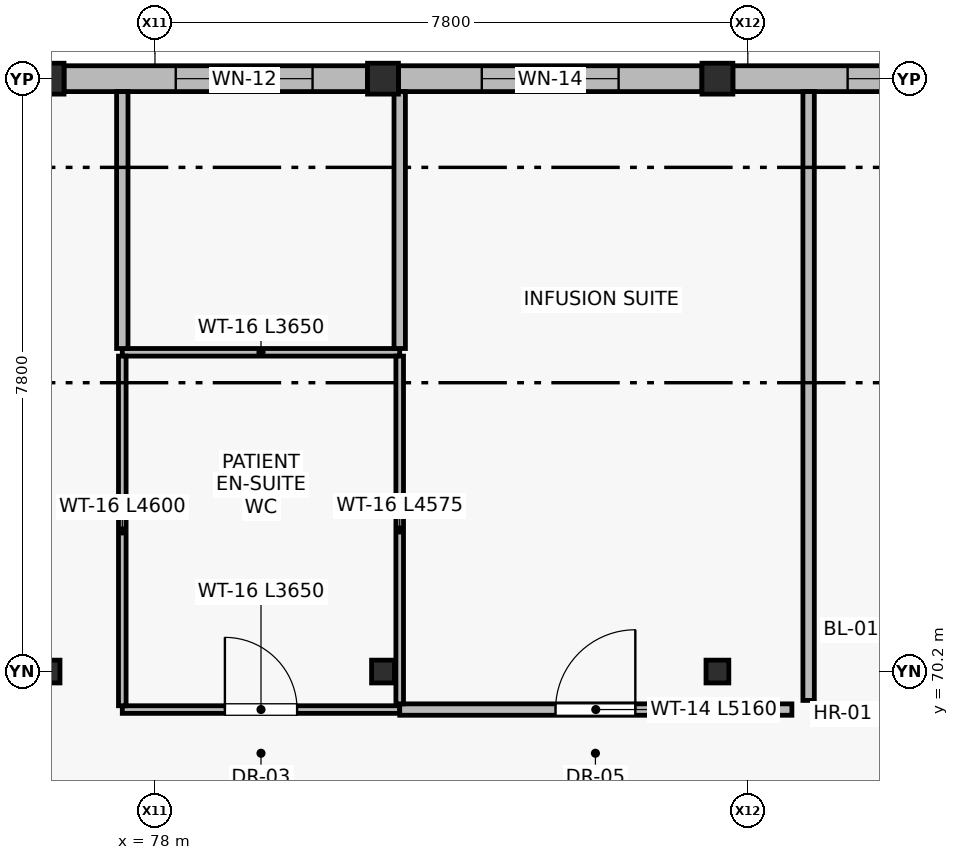
"""IFC4 building model, lengths in metres.
Left out: names, types, materials, properties, quantities, classifications, styles, units other than length and angle.
Written with IfcOpenShell. Run it as: python <this file> out.ifc"""

import sys

from ifc_helpers import new_model, si_unit, direction, frame, frame_2d, origin, origin_2d, place, context, subcontext, project, spatial, rectangle, hollow_circle, i_section, extrude, element, fill, save


model = new_model("IFC4")
c1 = context("Model", 3, precision=1e-05, world=origin(), true_north=direction((0.0, 1.0)))
c2 = subcontext(c1, "Body", "Model", "MODEL_VIEW")
j1 = project(units=[si_unit("LENGTHUNIT", "METRE"), si_unit("PLANEANGLEUNIT", "RADIAN")], contexts=[c1])
p1 = place(None, origin())
s1 = spatial("IfcSite", under=j1, at=p1, CompositionType="ELEMENT")
p2 = place(p1, origin())
s2 = spatial("IfcBuilding", under=s1, at=p2, CompositionType="ELEMENT")
p3 = place(p2, origin())
s3 = spatial("IfcBuildingStorey", under=s2, at=p3, CompositionType="ELEMENT", Elevation=0.0)
for number, where, z_axis, x_axis in (
    (1, (76.6, 78.0, 0.0), (0.0, 0.0, 1.0), (1.0, 0.0, 0.0)),
    (2, (81.0, 78.0, 0.0), (0.0, 0.0, 1.0), (1.0, 0.0, 0.0)),
    (3, (85.4, 78.0, 0.0), (0.0, 0.0, 1.0), (1.0, 0.0, 0.0)),
):
    element("IfcColumn", number, at=place(p3, frame(where, z_axis=z_axis, x_axis=x_axis)), inside=s3, PredefinedType="COLUMN", context=c2, shape_type="SweptSolid", body=[
        extrude(hollow_circle(Radius=0.203, WallThickness=0.016, at=origin_2d()), origin(), (0.0, 0.0, 1.0), 4.8),
    ])
for number, where, z_axis, x_axis in (
    (4, (76.6, 70.2, 0.0), (0.0, 0.0, 1.0), (1.0, 0.0, 0.0)),
    (5, (81.0, 70.2, 0.0), (0.0, 0.0, 1.0), (1.0, 0.0, 0.0)),
    (6, (85.4, 70.2, 0.0), (0.0, 0.0, 1.0), (1.0, 0.0, 0.0)),
):
    element("IfcColumn", number, at=place(p3, frame(where, z_axis=z_axis, x_axis=x_axis)), inside=s3, PredefinedType="COLUMN", context=c2, shape_type="SweptSolid", body=[
        extrude(i_section(OverallWidth=0.3, OverallDepth=0.3, WebThickness=0.011, FlangeThickness=0.019, at=origin_2d()), origin(), (0.0, 0.0, 1.0), 4.8),
    ])
p4 = place(p3, frame((76.803, 78.0, 0.0), z_axis=(0.0, 0.0, 1.0), x_axis=(1.0, 0.0, 0.0)))
e7 = element("IfcWall", 7, at=p4, inside=s3, PredefinedType="STANDARD", context=c2, shape_type="SweptSolid", body=[
    extrude(rectangle(XDim=3.994, YDim=0.34, at=frame_2d((1.997, 0.0))), origin(), (0.0, 0.0, 1.0), 4.14),
])
p5 = place(p4, frame((1.47, 0.0, 0.9)))
e8 = element("IfcOpeningElement", 8, at=p5, cuts=e7, PredefinedType="OPENING", context=c2, shape_type="SweptSolid", body=[
    extrude(rectangle(XDim=1.8, YDim=1.5, at=frame_2d((0.9, 0.75))), frame((0.0, 0.18, 0.0), z_axis=(0.0, -1.0, 0.0), x_axis=(1.0, 0.0, 0.0)), (0.0, 0.0, 1.0), 0.36),
])
p6 = place(p3, frame((81.203, 78.0, 0.0), z_axis=(0.0, 0.0, 1.0), x_axis=(1.0, 0.0, 0.0)))
e9 = element("IfcWall", 9, at=p6, inside=s3, PredefinedType="STANDARD", context=c2, shape_type="SweptSolid", body=[
    extrude(rectangle(XDim=3.994, YDim=0.34, at=frame_2d((1.997, 0.0))), origin(), (0.0, 0.0, 1.0), 4.14),
])
p7 = place(p6, frame((1.097, 0.0, 0.9)))
e10 = element("IfcOpeningElement", 10, at=p7, cuts=e9, PredefinedType="OPENING", context=c2, shape_type="SweptSolid", body=[
    extrude(rectangle(XDim=1.8, YDim=2.2, at=frame_2d((0.9, 1.1))), frame((0.0, 0.18, 0.0), z_axis=(0.0, -1.0, 0.0), x_axis=(1.0, 0.0, 0.0)), (0.0, 0.0, 1.0), 0.36),
])
p8 = place(p3, frame((85.603, 78.0, 0.0), z_axis=(0.0, 0.0, 1.0), x_axis=(1.0, 0.0, 0.0)))
e11 = element("IfcWall", 11, at=p8, inside=s3, PredefinedType="STANDARD", context=c2, shape_type="SweptSolid", body=[
    extrude(rectangle(XDim=3.993, YDim=0.34, at=frame_2d((1.997, 0.0))), origin(), (0.0, 0.0, 1.0), 4.14),
])
p9 = place(p8, frame((1.51, 0.0, 0.9)))
e12 = element("IfcOpeningElement", 12, at=p9, cuts=e11, PredefinedType="OPENING", context=c2, shape_type="SweptSolid", body=[
    extrude(rectangle(XDim=1.95, YDim=2.15, at=frame_2d((0.975, 1.075))), frame((0.0, 0.18, 0.0), z_axis=(0.0, -1.0, 0.0), x_axis=(1.0, 0.0, 0.0)), (0.0, 0.0, 1.0), 0.36),
])
p10 = place(p3, frame((77.57, 69.7, 0.0), z_axis=(0.0, 0.0, 1.0), x_axis=(1.0, 0.0, 0.0)))
e13 = element("IfcWall", 13, at=p10, inside=s3, PredefinedType="PARTITIONING", context=c2, shape_type="SweptSolid", body=[
    extrude(rectangle(XDim=3.65, YDim=0.1, at=frame_2d((1.825, 0.0))), origin(), (0.0, 0.0, 1.0), 4.54),
])
p11 = place(p10, frame((1.35, 0.0, 0.0)))
e14 = element("IfcOpeningElement", 14, at=p11, cuts=e13, PredefinedType="OPENING", context=c2, shape_type="SweptSolid", body=[
    extrude(rectangle(XDim=0.95, YDim=2.1, at=frame_2d((0.475, 1.05))), frame((0.0, 0.06, 0.0), z_axis=(0.0, -1.0, 0.0), x_axis=(1.0, 0.0, 0.0)), (0.0, 0.0, 1.0), 0.12),
])
p12 = place(p3, frame((77.57, 74.4, 0.0), z_axis=(0.0, 0.0, 1.0), x_axis=(1.0, 0.0, 0.0)))
e15 = element("IfcWall", 15, at=p12, inside=s3, PredefinedType="PARTITIONING", context=c2, shape_type="SweptSolid", body=[
    extrude(rectangle(XDim=3.65, YDim=0.1, at=frame_2d((1.825, 0.0))), origin(), (0.0, 0.0, 1.0), 4.54),
])
p13 = place(p3, frame((81.22, 69.7, 0.0), z_axis=(0.0, 0.0, 1.0), x_axis=(1.0, 0.0, 0.0)))
e16 = element("IfcWall", 16, at=p13, inside=s3, PredefinedType="PARTITIONING", context=c2, shape_type="SweptSolid", body=[
    extrude(rectangle(XDim=5.16, YDim=0.15, at=frame_2d((2.58, 0.0))), origin(), (0.0, 0.0, 1.0), 4.54),
])
p14 = place(p13, frame((2.05, 0.0, 0.0)))
e17 = element("IfcOpeningElement", 17, at=p14, cuts=e16, PredefinedType="OPENING", context=c2, shape_type="SweptSolid", body=[
    extrude(rectangle(XDim=1.05, YDim=2.15, at=frame_2d((0.525, 1.075))), frame((0.0, 0.085, 0.0), z_axis=(0.0, -1.0, 0.0), x_axis=(1.0, 0.0, 0.0)), (0.0, 0.0, 1.0), 0.17),
])
p15 = place(p3, frame((77.57, 69.75, 0.0), z_axis=(0.0, 0.0, 1.0), x_axis=(0.0, 1.0, 0.0)))
e18 = element("IfcWall", 18, at=p15, inside=s3, PredefinedType="PARTITIONING", context=c2, shape_type="SweptSolid", body=[
    extrude(rectangle(XDim=4.6, YDim=0.1, at=frame_2d((2.3, 0.0))), origin(), (0.0, 0.0, 1.0), 4.54),
])
p16 = place(p3, frame((81.22, 69.775, 0.0), z_axis=(0.0, 0.0, 1.0), x_axis=(0.0, 1.0, 0.0)))
e19 = element("IfcWall", 19, at=p16, inside=s3, PredefinedType="PARTITIONING", context=c2, shape_type="SweptSolid", body=[
    extrude(rectangle(XDim=4.575, YDim=0.1, at=frame_2d((2.288, 0.0))), origin(), (0.0, 0.0, 1.0), 4.09),
])
p17 = place(p3, frame((81.22, 74.45, 0.0), z_axis=(0.0, 0.0, 1.0), x_axis=(0.0, 1.0, 0.0)))
e20 = element("IfcWall", 20, at=p17, inside=s3, PredefinedType="PARTITIONING", context=c2, shape_type="SweptSolid", body=[
    extrude(rectangle(XDim=3.38, YDim=0.15, at=frame_2d((1.69, 0.0))), origin(), (0.0, 0.0, 1.0), 4.09),
])
p18 = place(p3, frame((86.6, 69.82, 0.0), z_axis=(0.0, 0.0, 1.0), x_axis=(0.0, 1.0, 0.0)))
e21 = element("IfcWall", 21, at=p18, inside=s3, PredefinedType="PARTITIONING", context=c2, shape_type="SweptSolid", body=[
    extrude(rectangle(XDim=8.01, YDim=0.15, at=frame_2d((4.005, 0.0))), origin(), (0.0, 0.0, 1.0), 4.54),
])
p19 = place(p3, frame((77.57, 74.45, 0.0), z_axis=(0.0, 0.0, 1.0), x_axis=(0.0, 1.0, 0.0)))
e22 = element("IfcWall", 22, at=p19, inside=s3, PredefinedType="PARTITIONING", context=c2, shape_type="SweptSolid", body=[
    extrude(rectangle(XDim=3.38, YDim=0.15, at=frame_2d((1.69, 0.0))), origin(), (0.0, 0.0, 1.0), 4.54),
])
p20 = place(p5, origin())
e23 = element("IfcWindow", 23, at=p20, inside=s3, PartitioningType="SINGLE_PANEL", PredefinedType="WINDOW", context=c2, shape_type="SweptSolid", body=[
    extrude(rectangle(XDim=1.8, YDim=1.5, at=frame_2d((0.9, 0.75))), frame((0.0, 0.03, 0.0), z_axis=(0.0, -1.0, 0.0), x_axis=(1.0, 0.0, 0.0)), (0.0, 0.0, 1.0), 0.06),
])
fill(e8, e23)
p21 = place(p7, origin())
e24 = element("IfcWindow", 24, at=p21, inside=s3, PartitioningType="SINGLE_PANEL", PredefinedType="WINDOW", context=c2, shape_type="SweptSolid", body=[
    extrude(rectangle(XDim=1.8, YDim=2.2, at=frame_2d((0.9, 1.1))), frame((0.0, 0.03, 0.0), z_axis=(0.0, -1.0, 0.0), x_axis=(1.0, 0.0, 0.0)), (0.0, 0.0, 1.0), 0.06),
])
fill(e10, e24)
p22 = place(p9, origin())
e25 = element("IfcWindow", 25, at=p22, inside=s3, PartitioningType="SINGLE_PANEL", PredefinedType="WINDOW", context=c2, shape_type="SweptSolid", body=[
    extrude(rectangle(XDim=1.95, YDim=2.15, at=frame_2d((0.975, 1.075))), frame((0.0, 0.03, 0.0), z_axis=(0.0, -1.0, 0.0), x_axis=(1.0, 0.0, 0.0)), (0.0, 0.0, 1.0), 0.06),
])
fill(e12, e25)
p23 = place(p11, origin())
e26 = element("IfcDoor", 26, at=p23, inside=s3, OperationType="SINGLE_SWING_LEFT", PredefinedType="DOOR", context=c2, shape_type="SweptSolid", body=[
    extrude(rectangle(XDim=0.95, YDim=2.1, at=frame_2d((0.475, 1.05))), frame((0.0, 0.025, 0.0), z_axis=(0.0, -1.0, 0.0), x_axis=(1.0, 0.0, 0.0)), (0.0, 0.0, 1.0), 0.05),
])
fill(e14, e26)
p24 = place(p14, origin())
e27 = element("IfcDoor", 27, at=p24, inside=s3, OperationType="SINGLE_SWING_RIGHT", PredefinedType="DOOR", context=c2, shape_type="SweptSolid", body=[
    extrude(rectangle(XDim=1.05, YDim=2.15, at=frame_2d((0.525, 1.075))), frame((0.0, 0.025, 0.0), z_axis=(0.0, -1.0, 0.0), x_axis=(1.0, 0.0, 0.0)), (0.0, 0.0, 1.0), 0.05),
])
fill(e17, e27)
save(model, sys.argv[1])
